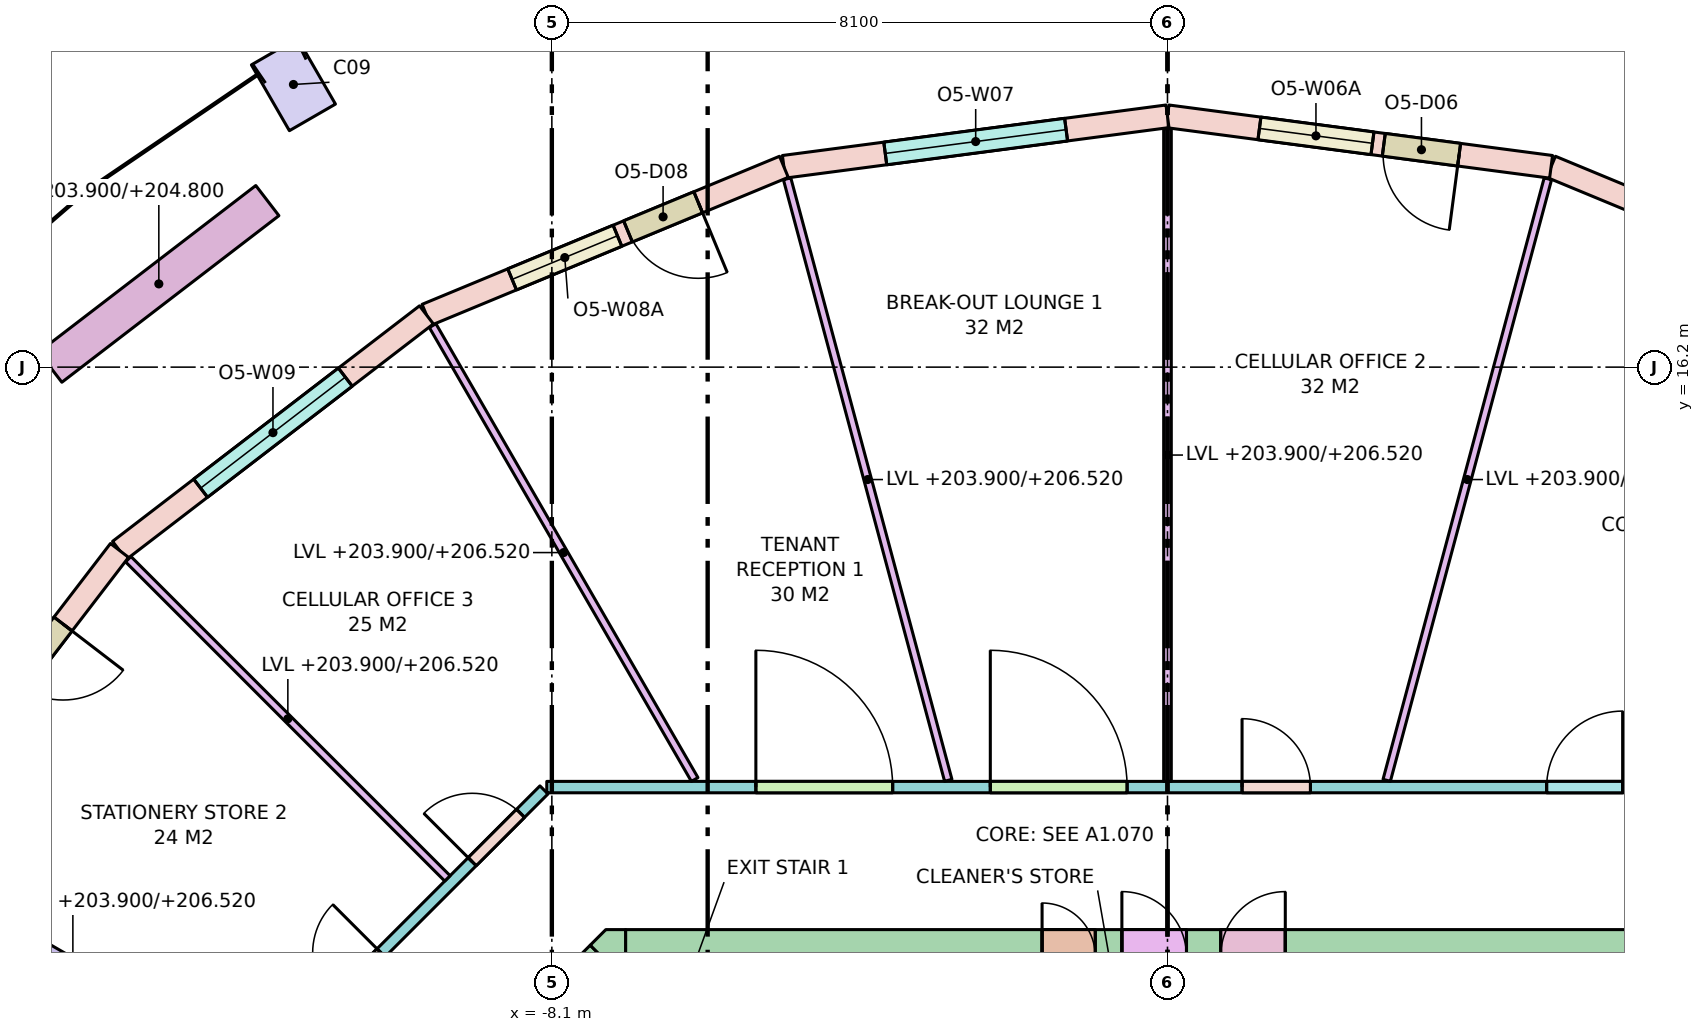
"""IFC4 building model, lengths in metres.
Left out: names, types, materials, properties, quantities, classifications, styles, units other than length and angle.
Written with IfcOpenShell. Run it as: python <this file> out.ifc"""

import sys

from ifc_helpers import new_model, si_unit, direction, frame, frame_2d, origin, origin_2d, place, context, subcontext, project, spatial, polyline, rectangle, outline, extrude, element, fill, save


model = new_model("IFC4")
c1 = context("Model", 3, precision=1e-05, world=origin(), true_north=direction((0.0, 1.0)))
c2 = subcontext(c1, "Body", "Model", "MODEL_VIEW")
j1 = project(units=[si_unit("LENGTHUNIT", "METRE"), si_unit("PLANEANGLEUNIT", "RADIAN")], contexts=[c1])
p1 = place(None, origin())
s1 = spatial("IfcSite", under=j1, at=p1, CompositionType="ELEMENT")
p2 = place(p1, origin())
s2 = spatial("IfcBuilding", under=s1, at=p2, CompositionType="ELEMENT")
p3 = place(p2, frame((0.0, 0.0, 203.9)))
s3 = spatial("IfcBuildingStorey", under=s2, at=p3, CompositionType="ELEMENT", Elevation=203.9)
p4 = place(p3, frame((-11.5, 19.919, 0.0), z_axis=(0.0, 0.0, 1.0), x_axis=(-0.866025403784, -0.5, 0.0)))
e1 = element("IfcColumn", 1, at=p4, inside=s3, PredefinedType="COLUMN", context=c2, shape_type="SweptSolid", body=[
    extrude(rectangle(XDim=0.7, YDim=1.0, at=origin_2d()), origin(), (0.0, 0.0, 1.0), 3.7),
])
p5 = place(p3, frame((-7.13, 8.45, -0.28), z_axis=(0.0, 0.0, 1.0), x_axis=(1.0, 0.0, 0.0)))
e2 = element("IfcWall", 2, at=p5, inside=s3, PredefinedType="SHEAR", context=c2, shape_type="SweptSolid", body=[
    extrude(rectangle(XDim=14.26, YDim=0.7, at=frame_2d((7.13, 0.0))), origin(), (0.0, 0.0, 1.0), 3.7),
])
p6 = place(p5, frame((5.48, 0.0, 0.28)))
e3 = element("IfcOpeningElement", 3, at=p6, cuts=e2, PredefinedType="OPENING", context=c2, shape_type="SweptSolid", body=[
    extrude(rectangle(XDim=0.7, YDim=2.1, at=frame_2d((0.35, 1.05))), frame((0.0, 0.36, 0.0), z_axis=(0.0, -1.0, 0.0), x_axis=(1.0, 0.0, 0.0)), (0.0, 0.0, 1.0), 0.72),
])
p7 = place(p5, frame((6.53, 0.0, 0.28)))
e4 = element("IfcOpeningElement", 4, at=p7, cuts=e2, PredefinedType="OPENING", context=c2, shape_type="SweptSolid", body=[
    extrude(rectangle(XDim=0.85, YDim=2.1, at=frame_2d((0.425, 1.05))), frame((0.0, 0.36, 0.0), z_axis=(0.0, -1.0, 0.0), x_axis=(1.0, 0.0, 0.0)), (0.0, 0.0, 1.0), 0.72),
])
p8 = place(p5, frame((7.83, 0.0, 0.28)))
e5 = element("IfcOpeningElement", 5, at=p8, cuts=e2, PredefinedType="OPENING", context=c2, shape_type="SweptSolid", body=[
    extrude(rectangle(XDim=0.85, YDim=2.1, at=frame_2d((0.425, 1.05))), frame((0.0, 0.36, 0.0), z_axis=(0.0, -1.0, 0.0), x_axis=(1.0, 0.0, 0.0)), (0.0, 0.0, 1.0), 0.72),
])
p9 = place(p3, frame((-10.347, 5.347, -0.28), z_axis=(0.0, 0.0, 1.0), x_axis=(0.707106781187, 0.707106781187, 0.0)))
e6 = element("IfcWall", 6, at=p9, inside=s3, PredefinedType="SHEAR", context=c2, shape_type="SweptSolid", body=[
    extrude(rectangle(XDim=4.243, YDim=0.7, at=frame_2d((2.121, 0.0))), origin(), (0.0, 0.0, 1.0), 3.7),
])
p10 = place(p9, frame((0.65, 0.0, 0.28)))
e7 = element("IfcOpeningElement", 7, at=p10, cuts=e6, PredefinedType="OPENING", context=c2, shape_type="SweptSolid", body=[
    extrude(rectangle(XDim=1.2, YDim=2.1, at=frame_2d((0.6, 1.05))), frame((0.0, 0.36, 0.0), z_axis=(0.0, -1.0, 0.0), x_axis=(1.0, 0.0, 0.0)), (0.0, 0.0, 1.0), 0.72),
])
p11 = place(p3, frame((0.0, 0.0, -0.28)))
e8 = element("IfcWall", 8, at=p11, inside=s3, PredefinedType="SHEAR", context=c2, shape_type="SweptSolid", body=[
    extrude(outline(polyline([(-7.39, 8.8), (-7.13, 8.8), (-7.13, 8.8), (-7.13, 8.13), (-7.595, 8.595), (-7.595, 8.595), (-7.595, 8.595), (-7.39, 8.8)])), origin(), (0.0, 0.0, 1.0), 3.7),
])
p12 = place(p3, frame((9.75, 16.887, 0.0), z_axis=(0.0, 0.0, 1.0), x_axis=(-0.923862504675, 0.382724538613, 0.0)))
e9 = element("IfcWall", 9, at=p12, inside=s3, PredefinedType="STANDARD", context=c2, shape_type="SweptSolid", body=[
    extrude(rectangle(XDim=5.091, YDim=0.3, at=frame_2d((2.545, 0.0))), origin(), (0.0, 0.0, 1.0), 3.42),
])
p13 = place(p12, frame((1.345, 0.0, 0.8)))
e10 = element("IfcOpeningElement", 10, at=p13, cuts=e9, PredefinedType="OPENING", context=c2, shape_type="SweptSolid", body=[
    extrude(rectangle(XDim=2.4, YDim=2.4, at=frame_2d((1.2, 1.2))), frame((0.0, 0.16, 0.0), z_axis=(0.0, -1.0, 0.0), x_axis=(1.0, 0.0, 0.0)), (0.0, 0.0, 1.0), 0.32),
])
p14 = place(p3, frame((5.047, 18.836, 0.0), z_axis=(0.0, 0.0, 1.0), x_axis=(-0.99144890792, 0.130495451964, 0.0)))
e11 = element("IfcWall", 11, at=p14, inside=s3, PredefinedType="STANDARD", context=c2, shape_type="SweptSolid", body=[
    extrude(rectangle(XDim=5.091, YDim=0.3, at=frame_2d((2.545, 0.0))), origin(), (0.0, 0.0, 1.0), 3.42),
])
p15 = place(p14, frame((1.22, 0.0, 0.0)))
e12 = element("IfcOpeningElement", 12, at=p15, cuts=e11, PredefinedType="OPENING", context=c2, shape_type="SweptSolid", body=[
    extrude(rectangle(XDim=1.0, YDim=2.4, at=frame_2d((0.5, 1.2))), frame((0.0, 0.16, 0.0), z_axis=(0.0, -1.0, 0.0), x_axis=(1.0, 0.0, 0.0)), (0.0, 0.0, 1.0), 0.32),
])
p16 = place(p14, frame((2.37, 0.0, 0.8)))
e13 = element("IfcOpeningElement", 13, at=p16, cuts=e11, PredefinedType="OPENING", context=c2, shape_type="SweptSolid", body=[
    extrude(rectangle(XDim=1.5, YDim=2.4, at=frame_2d((0.75, 1.2))), frame((0.0, 0.16, 0.0), z_axis=(0.0, -1.0, 0.0), x_axis=(1.0, 0.0, 0.0)), (0.0, 0.0, 1.0), 0.32),
])
p17 = place(p3, frame((0.0, 19.5, 0.0), z_axis=(0.0, 0.0, 1.0), x_axis=(-0.99144890792, -0.130495451964, 0.0)))
e14 = element("IfcWall", 14, at=p17, inside=s3, PredefinedType="STANDARD", context=c2, shape_type="SweptSolid", body=[
    extrude(rectangle(XDim=5.091, YDim=0.3, at=frame_2d((2.545, 0.0))), origin(), (0.0, 0.0, 1.0), 3.42),
])
p18 = place(p17, frame((1.345, 0.0, 0.8)))
e15 = element("IfcOpeningElement", 15, at=p18, cuts=e14, PredefinedType="OPENING", context=c2, shape_type="SweptSolid", body=[
    extrude(rectangle(XDim=2.4, YDim=2.4, at=frame_2d((1.2, 1.2))), frame((0.0, 0.16, 0.0), z_axis=(0.0, -1.0, 0.0), x_axis=(1.0, 0.0, 0.0)), (0.0, 0.0, 1.0), 0.32),
])
p19 = place(p3, frame((-5.047, 18.836, 0.0), z_axis=(0.0, 0.0, 1.0), x_axis=(-0.923862504675, -0.382724538613, 0.0)))
e16 = element("IfcWall", 16, at=p19, inside=s3, PredefinedType="STANDARD", context=c2, shape_type="SweptSolid", body=[
    extrude(rectangle(XDim=5.091, YDim=0.3, at=frame_2d((2.545, 0.0))), origin(), (0.0, 0.0, 1.0), 3.42),
])
p20 = place(p19, frame((1.22, 0.0, 0.0)))
e17 = element("IfcOpeningElement", 17, at=p20, cuts=e16, PredefinedType="OPENING", context=c2, shape_type="SweptSolid", body=[
    extrude(rectangle(XDim=1.0, YDim=2.4, at=frame_2d((0.5, 1.2))), frame((0.0, 0.16, 0.0), z_axis=(0.0, -1.0, 0.0), x_axis=(1.0, 0.0, 0.0)), (0.0, 0.0, 1.0), 0.32),
])
p21 = place(p19, frame((2.37, 0.0, 0.8)))
e18 = element("IfcOpeningElement", 18, at=p21, cuts=e16, PredefinedType="OPENING", context=c2, shape_type="SweptSolid", body=[
    extrude(rectangle(XDim=1.5, YDim=2.4, at=frame_2d((0.75, 1.2))), frame((0.0, 0.16, 0.0), z_axis=(0.0, -1.0, 0.0), x_axis=(1.0, 0.0, 0.0)), (0.0, 0.0, 1.0), 0.32),
])
p22 = place(p3, frame((-9.75, 16.887, 0.0), z_axis=(0.0, 0.0, 1.0), x_axis=(-0.79335619014, -0.608757714995, 0.0)))
e19 = element("IfcWall", 19, at=p22, inside=s3, PredefinedType="STANDARD", context=c2, shape_type="SweptSolid", body=[
    extrude(rectangle(XDim=5.091, YDim=0.3, at=frame_2d((2.545, 0.0))), origin(), (0.0, 0.0, 1.0), 3.42),
])
p23 = place(p22, frame((1.345, 0.0, 0.8)))
e20 = element("IfcOpeningElement", 20, at=p23, cuts=e19, PredefinedType="OPENING", context=c2, shape_type="SweptSolid", body=[
    extrude(rectangle(XDim=2.4, YDim=2.4, at=frame_2d((1.2, 1.2))), frame((0.0, 0.16, 0.0), z_axis=(0.0, -1.0, 0.0), x_axis=(1.0, 0.0, 0.0)), (0.0, 0.0, 1.0), 0.32),
])
p24 = place(p3, frame((-13.789, 13.789, 0.0), z_axis=(0.0, 0.0, 1.0), x_axis=(-0.608757714995, -0.79335619014, 0.0)))
e21 = element("IfcWall", 21, at=p24, inside=s3, PredefinedType="STANDARD", context=c2, shape_type="SweptSolid", body=[
    extrude(rectangle(XDim=5.091, YDim=0.3, at=frame_2d((2.545, 0.0))), origin(), (0.0, 0.0, 1.0), 3.42),
])
p25 = place(p24, frame((1.22, 0.0, 0.0)))
e22 = element("IfcOpeningElement", 22, at=p25, cuts=e21, PredefinedType="OPENING", context=c2, shape_type="SweptSolid", body=[
    extrude(rectangle(XDim=1.0, YDim=2.4, at=frame_2d((0.5, 1.2))), frame((0.0, 0.16, 0.0), z_axis=(0.0, -1.0, 0.0), x_axis=(1.0, 0.0, 0.0)), (0.0, 0.0, 1.0), 0.32),
])
p26 = place(p24, frame((2.37, 0.0, 0.8)))
e23 = element("IfcOpeningElement", 23, at=p26, cuts=e21, PredefinedType="OPENING", context=c2, shape_type="SweptSolid", body=[
    extrude(rectangle(XDim=1.5, YDim=2.4, at=frame_2d((0.75, 1.2))), frame((0.0, 0.16, 0.0), z_axis=(0.0, -1.0, 0.0), x_axis=(1.0, 0.0, 0.0)), (0.0, 0.0, 1.0), 0.32),
])
p27 = place(p3, frame((-11.843, 18.391, 0.0), z_axis=(0.0, 0.0, 1.0), x_axis=(-0.793326845617, -0.608795955984, 0.0)))
e24 = element("IfcWall", 24, at=p27, inside=s3, PredefinedType="PARAPET", context=c2, shape_type="SweptSolid", body=[
    extrude(rectangle(XDim=3.6, YDim=0.5, at=frame_2d((1.8, 0.0))), origin(), (0.0, 0.0, 1.0), 0.9),
])
p28 = place(p3, frame((-11.945, 6.896, 0.0), z_axis=(0.0, 0.0, 1.0), x_axis=(0.707106781187, 0.707106781187, 0.0)))
e25 = element("IfcWall", 25, at=p28, inside=s3, PredefinedType="PARTITIONING", context=c2, shape_type="SweptSolid", body=[
    extrude(rectangle(XDim=5.291, YDim=0.15, at=frame_2d((2.646, 0.0))), origin(), (0.0, 0.0, 1.0), 2.62),
])
p29 = place(p28, frame((3.956, 0.0, 0.0)))
e26 = element("IfcOpeningElement", 26, at=p29, cuts=e25, PredefinedType="OPENING", context=c2, shape_type="SweptSolid", body=[
    extrude(rectangle(XDim=0.9, YDim=2.1, at=frame_2d((0.45, 1.05))), frame((0.0, 0.085, 0.0), z_axis=(0.0, -1.0, 0.0), x_axis=(1.0, 0.0, 0.0)), (0.0, 0.0, 1.0), 0.17),
])
p30 = place(p28, frame((1.36, 0.0, 0.0)))
e27 = element("IfcOpeningElement", 27, at=p30, cuts=e25, PredefinedType="OPENING", context=c2, shape_type="SweptSolid", body=[
    extrude(rectangle(XDim=0.9, YDim=2.1, at=frame_2d((0.45, 1.05))), frame((0.0, 0.085, 0.0), z_axis=(0.0, -1.0, 0.0), x_axis=(1.0, 0.0, 0.0)), (0.0, 0.0, 1.0), 0.17),
])
p31 = place(p3, frame((-8.167, 10.675, 0.0), z_axis=(0.0, 0.0, 1.0), x_axis=(1.0, 0.0, 0.0)))
e28 = element("IfcWall", 28, at=p31, inside=s3, PredefinedType="PARTITIONING", context=c2, shape_type="SweptSolid", body=[
    extrude(rectangle(XDim=16.333, YDim=0.15, at=frame_2d((8.167, 0.0))), origin(), (0.0, 0.0, 1.0), 2.62),
])
p32 = place(p31, frame((13.155, 0.0, 0.0)))
e29 = element("IfcOpeningElement", 29, at=p32, cuts=e28, PredefinedType="OPENING", context=c2, shape_type="SweptSolid", body=[
    extrude(rectangle(XDim=1.0, YDim=2.1, at=frame_2d((0.5, 1.05))), frame((0.0, 0.085, 0.0), z_axis=(0.0, -1.0, 0.0), x_axis=(1.0, 0.0, 0.0)), (0.0, 0.0, 1.0), 0.17),
])
p33 = place(p31, frame((9.148, 0.0, 0.0)))
e30 = element("IfcOpeningElement", 30, at=p33, cuts=e28, PredefinedType="OPENING", context=c2, shape_type="SweptSolid", body=[
    extrude(rectangle(XDim=0.9, YDim=2.1, at=frame_2d((0.45, 1.05))), frame((0.0, 0.085, 0.0), z_axis=(0.0, -1.0, 0.0), x_axis=(1.0, 0.0, 0.0)), (0.0, 0.0, 1.0), 0.17),
])
p34 = place(p31, frame((5.835, 0.0, 0.0)))
e31 = element("IfcOpeningElement", 31, at=p34, cuts=e28, PredefinedType="OPENING", context=c2, shape_type="SweptSolid", body=[
    extrude(rectangle(XDim=1.8, YDim=2.1, at=frame_2d((0.9, 1.05))), frame((0.0, 0.085, 0.0), z_axis=(0.0, -1.0, 0.0), x_axis=(1.0, 0.0, 0.0)), (0.0, 0.0, 1.0), 0.17),
])
p35 = place(p31, frame((2.751, 0.0, 0.0)))
e32 = element("IfcOpeningElement", 32, at=p35, cuts=e28, PredefinedType="OPENING", context=c2, shape_type="SweptSolid", body=[
    extrude(rectangle(XDim=1.8, YDim=2.1, at=frame_2d((0.9, 1.05))), frame((0.0, 0.085, 0.0), z_axis=(0.0, -1.0, 0.0), x_axis=(1.0, 0.0, 0.0)), (0.0, 0.0, 1.0), 0.17),
])
p36 = place(p3, frame((2.884, 10.764, 0.0), z_axis=(0.0, 0.0, 1.0), x_axis=(0.258818011497, 0.965926103242, 0.0)))
e33 = element("IfcWall", 33, at=p36, inside=s3, PredefinedType="PARTITIONING", context=c2, shape_type="SweptSolid", body=[
    extrude(rectangle(XDim=8.192, YDim=0.1, at=frame_2d((4.096, 0.0))), origin(), (0.0, 0.0, 1.0), 2.62),
])
p37 = place(p3, frame((0.0, 10.75, 0.0), z_axis=(0.0, 0.0, 1.0), x_axis=(0.0, 1.0, 0.0)))
e34 = element("IfcWall", 34, at=p37, inside=s3, PredefinedType="PARTITIONING", context=c2, shape_type="SweptSolid", body=[
    extrude(rectangle(XDim=8.587, YDim=0.1, at=frame_2d((4.293, 0.0))), origin(), (0.0, 0.0, 1.0), 2.62),
])
p38 = place(p3, frame((-2.884, 10.764, 0.0), z_axis=(0.0, 0.0, 1.0), x_axis=(-0.258818011497, 0.965926103242, 0.0)))
e35 = element("IfcWall", 35, at=p38, inside=s3, PredefinedType="PARTITIONING", context=c2, shape_type="SweptSolid", body=[
    extrude(rectangle(XDim=8.192, YDim=0.1, at=frame_2d((4.096, 0.0))), origin(), (0.0, 0.0, 1.0), 2.62),
])
p39 = place(p3, frame((-6.221, 10.775, 0.0), z_axis=(0.0, 0.0, 1.0), x_axis=(-0.500015661236, 0.866016361577, 0.0)))
e36 = element("IfcWall", 36, at=p39, inside=s3, PredefinedType="PARTITIONING", context=c2, shape_type="SweptSolid", body=[
    extrude(rectangle(XDim=6.895, YDim=0.1, at=frame_2d((3.448, 0.0))), origin(), (0.0, 0.0, 1.0), 2.62),
])
p40 = place(p3, frame((-9.474, 9.474, 0.0), z_axis=(0.0, 0.0, 1.0), x_axis=(-0.707106781187, 0.707106781187, 0.0)))
e37 = element("IfcWall", 37, at=p40, inside=s3, PredefinedType="PARTITIONING", context=c2, shape_type="SweptSolid", body=[
    extrude(rectangle(XDim=5.938, YDim=0.1, at=frame_2d((2.969, 0.0))), origin(), (0.0, 0.0, 1.0), 2.62),
])
p41 = place(p3, frame((-12.058, 6.961, 0.0), z_axis=(0.0, 0.0, 1.0), x_axis=(-0.86601436245, 0.500019123664, 0.0)))
e38 = element("IfcWall", 38, at=p41, inside=s3, PredefinedType="PARTITIONING", context=c2, shape_type="SweptSolid", body=[
    extrude(rectangle(XDim=5.414, YDim=0.2, at=frame_2d((2.707, 0.0))), origin(), (0.0, 0.0, 1.0), 2.62),
])
p42 = place(p15, origin())
e39 = element("IfcDoor", 39, at=p42, inside=s3, OperationType="SINGLE_SWING_LEFT", PredefinedType="DOOR", context=c2, shape_type="SweptSolid", body=[
    extrude(rectangle(XDim=1.0, YDim=2.4, at=frame_2d((0.5, 1.2))), frame((0.0, 0.025, 0.0), z_axis=(0.0, -1.0, 0.0), x_axis=(1.0, 0.0, 0.0)), (0.0, 0.0, 1.0), 0.05),
])
fill(e12, e39)
p43 = place(p16, origin())
e40 = element("IfcWindow", 40, at=p43, inside=s3, PartitioningType="SINGLE_PANEL", PredefinedType="WINDOW", context=c2, shape_type="SweptSolid", body=[
    extrude(rectangle(XDim=1.5, YDim=2.4, at=frame_2d((0.75, 1.2))), frame((0.0, 0.03, 0.0), z_axis=(0.0, -1.0, 0.0), x_axis=(1.0, 0.0, 0.0)), (0.0, 0.0, 1.0), 0.06),
])
fill(e13, e40)
p44 = place(p18, origin())
e41 = element("IfcWindow", 41, at=p44, inside=s3, PartitioningType="SINGLE_PANEL", PredefinedType="WINDOW", context=c2, shape_type="SweptSolid", body=[
    extrude(rectangle(XDim=2.4, YDim=2.4, at=frame_2d((1.2, 1.2))), frame((0.0, 0.03, 0.0), z_axis=(0.0, -1.0, 0.0), x_axis=(1.0, 0.0, 0.0)), (0.0, 0.0, 1.0), 0.06),
])
fill(e15, e41)
p45 = place(p20, origin())
e42 = element("IfcDoor", 42, at=p45, inside=s3, OperationType="SINGLE_SWING_LEFT", PredefinedType="DOOR", context=c2, shape_type="SweptSolid", body=[
    extrude(rectangle(XDim=1.0, YDim=2.4, at=frame_2d((0.5, 1.2))), frame((0.0, 0.025, 0.0), z_axis=(0.0, -1.0, 0.0), x_axis=(1.0, 0.0, 0.0)), (0.0, 0.0, 1.0), 0.05),
])
fill(e17, e42)
p46 = place(p21, origin())
e43 = element("IfcWindow", 43, at=p46, inside=s3, PartitioningType="SINGLE_PANEL", PredefinedType="WINDOW", context=c2, shape_type="SweptSolid", body=[
    extrude(rectangle(XDim=1.5, YDim=2.4, at=frame_2d((0.75, 1.2))), frame((0.0, 0.03, 0.0), z_axis=(0.0, -1.0, 0.0), x_axis=(1.0, 0.0, 0.0)), (0.0, 0.0, 1.0), 0.06),
])
fill(e18, e43)
p47 = place(p23, origin())
e44 = element("IfcWindow", 44, at=p47, inside=s3, PartitioningType="SINGLE_PANEL", PredefinedType="WINDOW", context=c2, shape_type="SweptSolid", body=[
    extrude(rectangle(XDim=2.4, YDim=2.4, at=frame_2d((1.2, 1.2))), frame((0.0, 0.03, 0.0), z_axis=(0.0, -1.0, 0.0), x_axis=(1.0, 0.0, 0.0)), (0.0, 0.0, 1.0), 0.06),
])
fill(e20, e44)
p48 = place(p25, origin())
e45 = element("IfcDoor", 45, at=p48, inside=s3, OperationType="SINGLE_SWING_LEFT", PredefinedType="DOOR", context=c2, shape_type="SweptSolid", body=[
    extrude(rectangle(XDim=1.0, YDim=2.4, at=frame_2d((0.5, 1.2))), frame((0.0, 0.025, 0.0), z_axis=(0.0, -1.0, 0.0), x_axis=(1.0, 0.0, 0.0)), (0.0, 0.0, 1.0), 0.05),
])
fill(e22, e45)
p49 = place(p32, origin())
e46 = element("IfcDoor", 46, at=p49, inside=s3, OperationType="SINGLE_SWING_RIGHT", PredefinedType="DOOR", context=c2, shape_type="SweptSolid", body=[
    extrude(rectangle(XDim=1.0, YDim=2.1, at=frame_2d((0.5, 1.05))), frame((0.0, 0.025, 0.0), z_axis=(0.0, -1.0, 0.0), x_axis=(1.0, 0.0, 0.0)), (0.0, 0.0, 1.0), 0.05),
])
fill(e29, e46)
p50 = place(p33, origin())
e47 = element("IfcDoor", 47, at=p50, inside=s3, OperationType="SINGLE_SWING_LEFT", PredefinedType="DOOR", context=c2, shape_type="SweptSolid", body=[
    extrude(rectangle(XDim=0.9, YDim=2.1, at=frame_2d((0.45, 1.05))), frame((0.0, 0.025, 0.0), z_axis=(0.0, -1.0, 0.0), x_axis=(1.0, 0.0, 0.0)), (0.0, 0.0, 1.0), 0.05),
])
fill(e30, e47)
p51 = place(p34, origin())
e48 = element("IfcDoor", 48, at=p51, inside=s3, OperationType="DOUBLE_DOOR_SINGLE_SWING", PredefinedType="DOOR", context=c2, shape_type="SweptSolid", body=[
    extrude(rectangle(XDim=1.8, YDim=2.1, at=frame_2d((0.9, 1.05))), frame((0.0, 0.025, 0.0), z_axis=(0.0, -1.0, 0.0), x_axis=(1.0, 0.0, 0.0)), (0.0, 0.0, 1.0), 0.05),
])
fill(e31, e48)
p52 = place(p35, origin())
e49 = element("IfcDoor", 49, at=p52, inside=s3, OperationType="DOUBLE_DOOR_SINGLE_SWING", PredefinedType="DOOR", context=c2, shape_type="SweptSolid", body=[
    extrude(rectangle(XDim=1.8, YDim=2.1, at=frame_2d((0.9, 1.05))), frame((0.0, 0.025, 0.0), z_axis=(0.0, -1.0, 0.0), x_axis=(1.0, 0.0, 0.0)), (0.0, 0.0, 1.0), 0.05),
])
fill(e32, e49)
p53 = place(p29, origin())
e50 = element("IfcDoor", 50, at=p53, inside=s3, OperationType="SINGLE_SWING_LEFT", PredefinedType="DOOR", context=c2, shape_type="SweptSolid", body=[
    extrude(rectangle(XDim=0.9, YDim=2.1, at=frame_2d((0.45, 1.05))), frame((0.0, 0.025, 0.0), z_axis=(0.0, -1.0, 0.0), x_axis=(1.0, 0.0, 0.0)), (0.0, 0.0, 1.0), 0.05),
])
fill(e26, e50)
p54 = place(p30, origin())
e51 = element("IfcDoor", 51, at=p54, inside=s3, OperationType="SINGLE_SWING_RIGHT", PredefinedType="DOOR", context=c2, shape_type="SweptSolid", body=[
    extrude(rectangle(XDim=0.9, YDim=2.1, at=frame_2d((0.45, 1.05))), frame((0.0, 0.025, 0.0), z_axis=(0.0, -1.0, 0.0), x_axis=(1.0, 0.0, 0.0)), (0.0, 0.0, 1.0), 0.05),
])
fill(e27, e51)
save(model, sys.argv[1])
